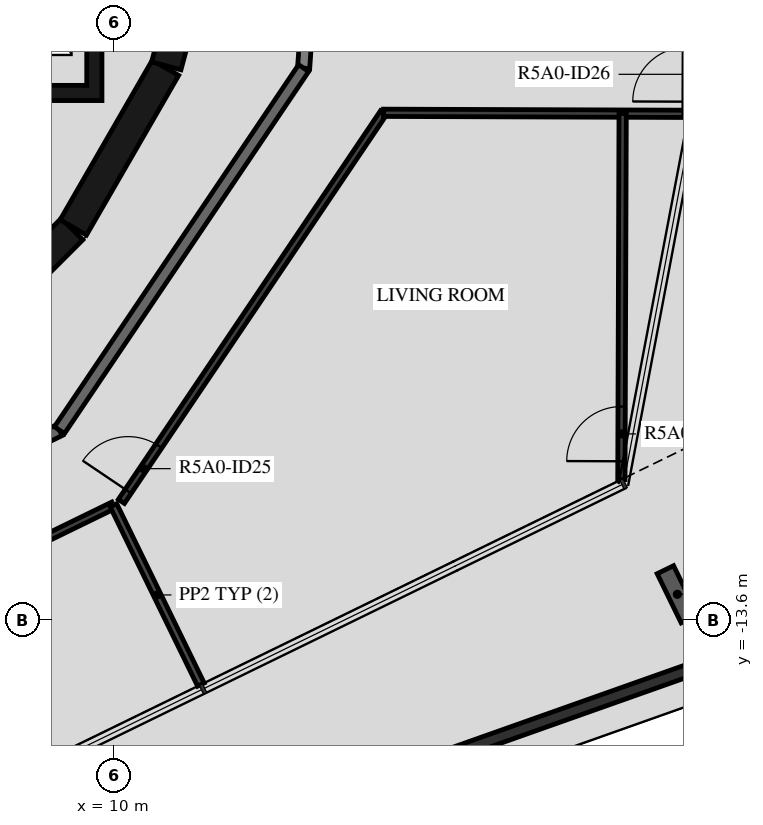
"""IFC4 building model, lengths in metres.
Left out: names, types, materials, properties, quantities, classifications, styles, units other than length and angle.
Written with IfcOpenShell. Run it as: python <this file> out.ifc"""

import sys

from ifc_helpers import new_model, si_unit, direction, frame, frame_2d, origin, origin_2d, place, context, subcontext, project, spatial, polyline, rectangle, i_section, outline, extrude, element, fill, save


model = new_model("IFC4")
c1 = context("Model", 3, precision=1e-05, world=origin(), true_north=direction((0.0, 1.0)))
c2 = subcontext(c1, "Body", "Model", "MODEL_VIEW")
j1 = project(units=[si_unit("LENGTHUNIT", "METRE"), si_unit("PLANEANGLEUNIT", "RADIAN")], contexts=[c1])
p1 = place(None, origin())
s1 = spatial("IfcSite", under=j1, at=p1, CompositionType="ELEMENT")
p2 = place(p1, origin())
s2 = spatial("IfcBuilding", under=s1, at=p2, CompositionType="ELEMENT")
p3 = place(p2, frame((0.0, 0.0, 188.4)))
s3 = spatial("IfcBuildingStorey", under=s2, at=p3, CompositionType="ELEMENT", Elevation=188.4)
p4 = place(p3, frame((19.263, -13.169, -0.45), z_axis=(0.0, 0.0, 1.0), x_axis=(-0.898794095235, -0.438371046456, 0.0)))
e1 = element("IfcColumn", 1, at=p4, inside=s3, PredefinedType="COLUMN", context=c2, shape_type="SweptSolid", body=[
    extrude(i_section(OverallWidth=0.3, OverallDepth=0.9, WebThickness=0.019, FlangeThickness=0.035, FilletRadius=0.03, at=origin_2d()), origin(), (0.0, 0.0, 1.0), 3.57),
])
p5 = place(p3, frame((23.874, -12.851, 0.03), z_axis=(0.0, 0.0, 1.0), x_axis=(-0.942641899569, -0.33380570573, 0.0)))
e2 = element("IfcWall", 2, at=p5, inside=s3, PredefinedType="PARAPET", context=c2, shape_type="SweptSolid", body=[
    extrude(rectangle(XDim=18.214, YDim=0.2, at=frame_2d((9.107, 0.0))), origin(), (0.0, 0.0, 1.0), 1.5),
])
p6 = place(p3, frame((7.164, -9.308, 0.0), z_axis=(0.0, 0.0, 1.0), x_axis=(0.707106781187, 0.707106781187, 0.0)))
e3 = element("IfcWall", 3, at=p6, inside=s3, PredefinedType="SHEAR", context=c2, shape_type="SweptSolid", body=[
    extrude(rectangle(XDim=3.032, YDim=0.5, at=frame_2d((1.516, 0.0))), origin(), (0.0, 0.0, 1.0), 3.12),
])
for number, where, z_axis, x_axis in (
    (4, (9.329, -7.137, 0.0), (0.0, 0.0, 1.0), (0.5, 0.866, 0.0)),
    (5, (10.858, -4.479, 0.0), (0.0, 0.0, 1.0), (0.259, 0.966, 0.0)),
):
    element("IfcWall", number, at=place(p3, frame(where, z_axis=z_axis, x_axis=x_axis)), inside=s3, PredefinedType="SHEAR", context=c2, shape_type="SweptSolid", body=[
        extrude(rectangle(XDim=3.033, YDim=0.5, at=frame_2d((1.516, 0.0))), origin(), (0.0, 0.0, 1.0), 3.12),
    ])
p7 = place(p3, origin())
e6 = element("IfcWall", 6, at=p7, inside=s3, PredefinedType="SHEAR", context=c2, shape_type="SweptSolid", body=[
    extrude(outline(polyline([(9.8, -5.05), (9.8, -4.8), (9.8, -1.9), (9.55, -1.9), (9.55, -4.8), (7.65, -4.8), (7.65, -1.9), (7.4, -1.9), (7.4, -4.8), (5.5, -4.8), (5.5, -1.9), (5.25, -1.9), (5.25, -4.8), (3.35, -4.8), (3.35, -1.9), (3.1, -1.9), (3.1, -4.8), (1.2, -4.8), (1.2, -1.9), (0.95, -1.9), (0.95, -4.8), (-0.95, -4.8), (-0.95, -1.9), (-1.2, -1.9), (-1.2, -4.8), (-3.1, -4.8), (-3.1, -1.9), (-3.35, -1.9), (-3.35, -4.8), (-5.25, -4.8), (-5.25, -1.9), (-5.5, -1.9), (-5.5, -4.8), (-7.4, -4.8), (-7.4, -1.9), (-7.65, -1.9), (-7.65, -4.8), (-9.55, -4.8), (-9.55, -1.9), (-9.8, -1.9), (-9.8, -4.8), (-9.8, -5.05), (9.8, -5.05)])), origin(), (0.0, 0.0, 1.0), 3.12),
])
p8 = place(p3, frame((13.117, -4.517, 0.0), z_axis=(0.0, 0.0, 1.0), x_axis=(0.069736659613, 0.997565435601, 0.0)))
e7 = element("IfcWall", 7, at=p8, inside=s3, PredefinedType="STANDARD", context=c2, shape_type="SweptSolid", body=[
    extrude(rectangle(XDim=2.654, YDim=0.2, at=frame_2d((1.327, 0.0))), origin(), (0.0, 0.0, 1.0), 3.12),
])
p9 = place(p8, frame((1.134, 0.0, 0.0)))
e8 = element("IfcOpeningElement", 8, at=p9, cuts=e7, PredefinedType="OPENING", context=c2, shape_type="SweptSolid", body=[
    extrude(rectangle(XDim=1.2, YDim=2.1, at=frame_2d((0.6, 1.05))), frame((0.0, 0.11, 0.0), z_axis=(0.0, -1.0, 0.0), x_axis=(1.0, 0.0, 0.0)), (0.0, 0.0, 1.0), 0.22),
])
p10 = place(p3, frame((2.647, -13.618, 0.0), z_axis=(0.0, 0.0, 1.0), x_axis=(0.898796543751, 0.438366026218, 0.0)))
e9 = element("IfcWall", 9, at=p10, inside=s3, PredefinedType="STANDARD", context=c2, shape_type="SweptSolid", body=[
    extrude(rectangle(XDim=7.181, YDim=0.2, at=frame_2d((3.591, 0.0))), origin(), (0.0, 0.0, 1.0), 3.12),
])
p11 = place(p10, frame((0.2, 0.0, 0.0)))
e10 = element("IfcOpeningElement", 10, at=p11, cuts=e9, PredefinedType="OPENING", context=c2, shape_type="SweptSolid", body=[
    extrude(rectangle(XDim=1.0, YDim=2.1, at=frame_2d((0.5, 1.05))), frame((0.0, 0.11, 0.0), z_axis=(0.0, -1.0, 0.0), x_axis=(1.0, 0.0, 0.0)), (0.0, 0.0, 1.0), 0.22),
])
p12 = place(p3, frame((9.101, -10.47, 0.0), z_axis=(0.0, 0.0, 1.0), x_axis=(0.559195469534, 0.829035841718, 0.0)))
e11 = element("IfcWall", 11, at=p12, inside=s3, PredefinedType="STANDARD", context=c2, shape_type="SweptSolid", body=[
    extrude(rectangle(XDim=7.181, YDim=0.2, at=frame_2d((3.591, 0.0))), origin(), (0.0, 0.0, 1.0), 3.12),
])
p13 = place(p3, frame((3.074, -15.078, 0.0), z_axis=(0.0, 0.0, 1.0), x_axis=(0.898800770739, 0.438357359377, 0.0)))
e12 = element("IfcWall", 12, at=p13, inside=s3, PredefinedType="PARTITIONING", context=c2, shape_type="SweptSolid", body=[
    extrude(rectangle(XDim=7.694, YDim=0.12, at=frame_2d((3.847, 0.0))), origin(), (0.0, 0.0, 1.0), 3.12),
])
p14 = place(p13, frame((0.2, 0.0, 0.0)))
e13 = element("IfcOpeningElement", 13, at=p14, cuts=e12, PredefinedType="OPENING", context=c2, shape_type="SweptSolid", body=[
    extrude(rectangle(XDim=0.9, YDim=2.1, at=frame_2d((0.45, 1.05))), frame((0.0, 0.07, 0.0), z_axis=(0.0, -1.0, 0.0), x_axis=(1.0, 0.0, 0.0)), (0.0, 0.0, 1.0), 0.14),
])
p15 = place(p3, frame((10.12, -11.642, 0.0), z_axis=(0.0, 0.0, 1.0), x_axis=(0.559201404667, 0.829031838362, 0.0)))
e14 = element("IfcWall", 14, at=p15, inside=s3, PredefinedType="PARTITIONING", context=c2, shape_type="SweptSolid", body=[
    extrude(rectangle(XDim=7.709, YDim=0.12, at=frame_2d((3.854, 0.0))), origin(), (0.0, 0.0, 1.0), 3.12),
])
p16 = place(p15, frame((0.2, 0.0, 0.0)))
e15 = element("IfcOpeningElement", 15, at=p16, cuts=e14, PredefinedType="OPENING", context=c2, shape_type="SweptSolid", body=[
    extrude(rectangle(XDim=0.9, YDim=2.1, at=frame_2d((0.45, 1.05))), frame((0.0, 0.07, 0.0), z_axis=(0.0, -1.0, 0.0), x_axis=(1.0, 0.0, 0.0)), (0.0, 0.0, 1.0), 0.14),
])
p17 = place(p3, frame((14.431, -5.251, 0.0), z_axis=(0.0, 0.0, 1.0), x_axis=(0.999994153659, -0.003419451456, 0.0)))
e16 = element("IfcWall", 16, at=p17, inside=s3, PredefinedType="PARTITIONING", context=c2, shape_type="SweptSolid", body=[
    extrude(rectangle(XDim=4.998, YDim=0.12, at=frame_2d((2.499, 0.0))), origin(), (0.0, 0.0, 1.0), 3.12),
])
p18 = place(p3, frame((11.427, -14.654, 0.0), z_axis=(0.0, 0.0, 1.0), x_axis=(-0.438410435857, 0.898774882677, 0.0)))
e17 = element("IfcWall", 17, at=p18, inside=s3, PredefinedType="PARTITIONING", context=c2, shape_type="SweptSolid", body=[
    extrude(rectangle(XDim=3.281, YDim=0.12, at=frame_2d((1.64, 0.0))), origin(), (0.0, 0.0, 1.0), 2.73),
])
p19 = place(p3, frame((18.343, -11.282, 0.0), z_axis=(0.0, 0.0, 1.0), x_axis=(0.003448675073, 0.999994053302, 0.0)))
e18 = element("IfcWall", 18, at=p19, inside=s3, PredefinedType="PARTITIONING", context=c2, shape_type="SweptSolid", body=[
    extrude(rectangle(XDim=6.017, YDim=0.12, at=frame_2d((3.009, 0.0))), origin(), (0.0, 0.0, 1.0), 3.12),
])
p20 = place(p19, frame((0.3, 0.0, 0.0)))
e19 = element("IfcOpeningElement", 19, at=p20, cuts=e18, PredefinedType="OPENING", context=c2, shape_type="SweptSolid", body=[
    extrude(rectangle(XDim=0.9, YDim=2.1, at=frame_2d((0.45, 1.05))), frame((0.0, 0.07, 0.0), z_axis=(0.0, -1.0, 0.0), x_axis=(1.0, 0.0, 0.0)), (0.0, 0.0, 1.0), 0.14),
])
p21 = place(p16, origin())
e20 = element("IfcDoor", 20, at=p21, inside=s3, OperationType="SINGLE_SWING_RIGHT", PredefinedType="DOOR", context=c2, shape_type="SweptSolid", body=[
    extrude(rectangle(XDim=0.9, YDim=2.1, at=frame_2d((0.45, 1.05))), frame((0.0, 0.025, 0.0), z_axis=(0.0, -1.0, 0.0), x_axis=(1.0, 0.0, 0.0)), (0.0, 0.0, 1.0), 0.05),
])
fill(e15, e20)
p22 = place(p20, origin())
e21 = element("IfcDoor", 21, at=p22, inside=s3, OperationType="SINGLE_SWING_RIGHT", PredefinedType="DOOR", context=c2, shape_type="SweptSolid", body=[
    extrude(rectangle(XDim=0.9, YDim=2.1, at=frame_2d((0.45, 1.05))), frame((0.0, 0.025, 0.0), z_axis=(0.0, -1.0, 0.0), x_axis=(1.0, 0.0, 0.0)), (0.0, 0.0, 1.0), 0.05),
])
fill(e19, e21)
save(model, sys.argv[1])
